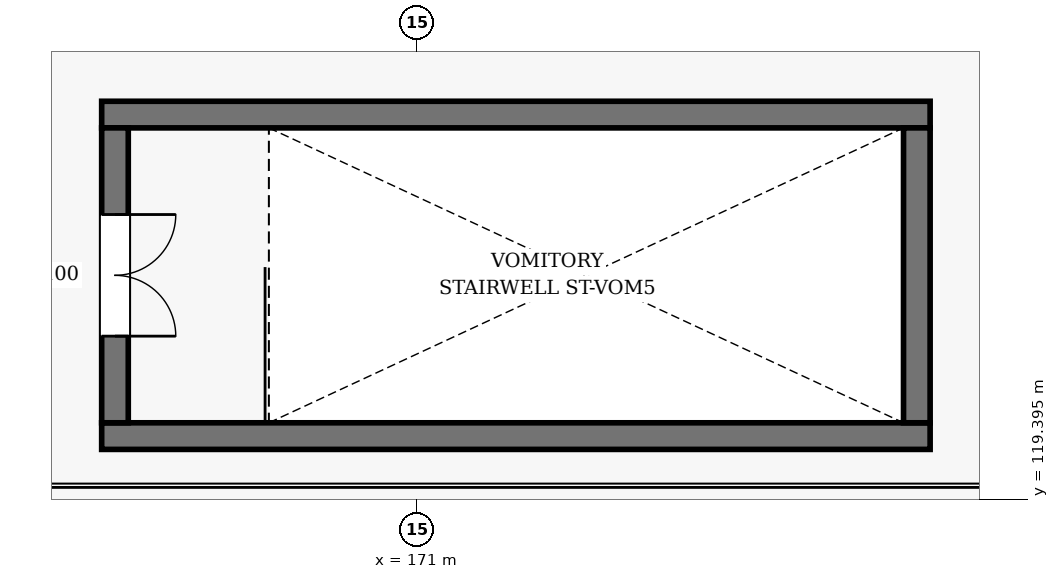
"""IFC4 building model, lengths in metres.
Left out: names, types, materials, properties, quantities, classifications, styles, units other than length and angle.
Written with IfcOpenShell. Run it as: python <this file> out.ifc"""

import sys

from ifc_helpers import new_model, si_unit, direction, frame, frame_2d, origin, place, context, subcontext, project, spatial, rectangle, extrude, element, fill, save


model = new_model("IFC4")
c1 = context("Model", 3, precision=1e-05, world=origin(), true_north=direction((0.0, 1.0)))
c2 = subcontext(c1, "Body", "Model", "MODEL_VIEW")
j1 = project(units=[si_unit("LENGTHUNIT", "METRE"), si_unit("PLANEANGLEUNIT", "RADIAN")], contexts=[c1])
p1 = place(None, origin())
s1 = spatial("IfcSite", under=j1, at=p1, CompositionType="ELEMENT")
p2 = place(p1, origin())
s2 = spatial("IfcBuilding", under=s1, at=p2, CompositionType="ELEMENT")
p3 = place(p2, frame((0.0, 0.0, 5.4)))
s3 = spatial("IfcBuildingStorey", under=s2, at=p3, CompositionType="ELEMENT", Elevation=5.4)
for number, where, z_axis, x_axis in (
    (1, (166.85, 120.225, 0.0), (0.0, 0.0, 1.0), (1.0, 0.0, 0.0)),
    (2, (177.75, 124.455, 0.0), (0.0, 0.0, 1.0), (-1.0, 0.0, 0.0)),
):
    element("IfcWall", number, at=place(p3, frame(where, z_axis=z_axis, x_axis=x_axis)), inside=s3, PredefinedType="SHEAR", context=c2, shape_type="SweptSolid", body=[
        extrude(rectangle(XDim=10.9, YDim=0.35, at=frame_2d((5.45, 0.0))), origin(), (0.0, 0.0, 1.0), 5.4),
    ])
p4 = place(p3, frame((167.025, 124.28, 0.0), z_axis=(0.0, 0.0, 1.0), x_axis=(0.0, -1.0, 0.0)))
e3 = element("IfcWall", 3, at=p4, inside=s3, PredefinedType="SHEAR", context=c2, shape_type="SweptSolid", body=[
    extrude(rectangle(XDim=3.88, YDim=0.35, at=frame_2d((1.94, 0.0))), origin(), (0.0, 0.0, 1.0), 5.4),
])
p5 = place(p4, frame((1.14, 0.0, 0.0)))
e4 = element("IfcOpeningElement", 4, at=p5, cuts=e3, PredefinedType="OPENING", context=c2, shape_type="SweptSolid", body=[
    extrude(rectangle(XDim=1.6, YDim=2.2, at=frame_2d((0.8, 1.1))), frame((0.0, 0.185, 0.0), z_axis=(0.0, -1.0, 0.0), x_axis=(1.0, 0.0, 0.0)), (0.0, 0.0, 1.0), 0.37),
])
p6 = place(p3, frame((177.575, 120.4, 0.0), z_axis=(0.0, 0.0, 1.0), x_axis=(0.0, 1.0, 0.0)))
e5 = element("IfcWall", 5, at=p6, inside=s3, PredefinedType="SHEAR", context=c2, shape_type="SweptSolid", body=[
    extrude(rectangle(XDim=3.88, YDim=0.35, at=frame_2d((1.94, 0.0))), origin(), (0.0, 0.0, 1.0), 5.4),
])
p7 = place(p5, origin())
e6 = element("IfcDoor", 6, at=p7, inside=s3, OperationType="DOUBLE_DOOR_SINGLE_SWING", PredefinedType="DOOR", context=c2, shape_type="SweptSolid", body=[
    extrude(rectangle(XDim=1.6, YDim=2.2, at=frame_2d((0.8, 1.1))), frame((0.0, 0.025, 0.0), z_axis=(0.0, -1.0, 0.0), x_axis=(1.0, 0.0, 0.0)), (0.0, 0.0, 1.0), 0.05),
])
fill(e4, e6)
save(model, sys.argv[1])
